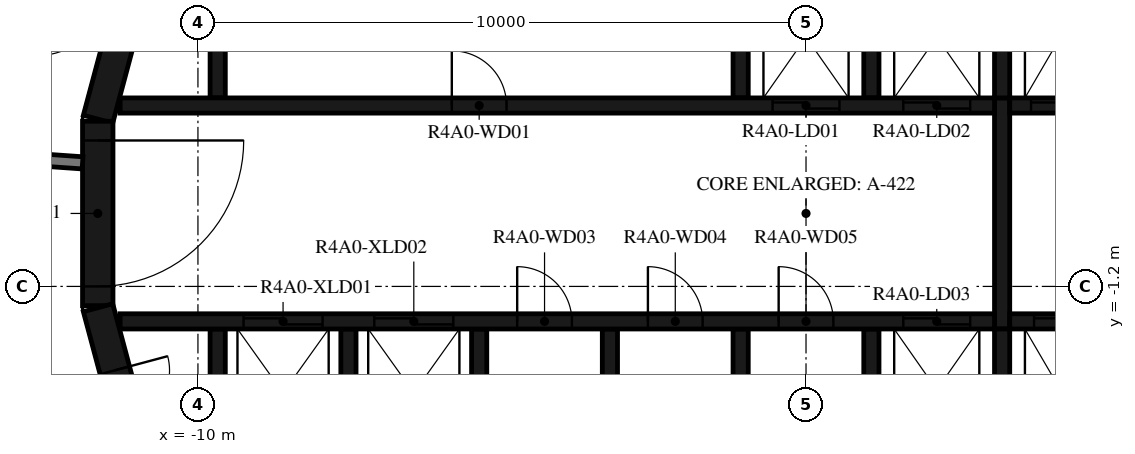
"""IFC4 building model, lengths in metres.
Left out: names, types, materials, properties, quantities, classifications, styles, units other than length and angle.
Written with IfcOpenShell. Run it as: python <this file> out.ifc"""

import sys

from ifc_helpers import new_model, si_unit, direction, frame, frame_2d, origin, place, context, subcontext, project, spatial, polyline, rectangle, outline, extrude, element, fill, save


model = new_model("IFC4")
c1 = context("Model", 3, precision=1e-05, world=origin(), true_north=direction((0.0, 1.0)))
c2 = subcontext(c1, "Body", "Model", "MODEL_VIEW")
j1 = project(units=[si_unit("LENGTHUNIT", "METRE"), si_unit("PLANEANGLEUNIT", "RADIAN")], contexts=[c1])
p1 = place(None, origin())
s1 = spatial("IfcSite", under=j1, at=p1, CompositionType="ELEMENT")
p2 = place(p1, origin())
s2 = spatial("IfcBuilding", under=s1, at=p2, CompositionType="ELEMENT")
p3 = place(p2, frame((0.0, 0.0, 158.7)))
s3 = spatial("IfcBuildingStorey", under=s2, at=p3, CompositionType="ELEMENT", Elevation=158.7)
p4 = place(p3, frame((-10.858, 4.479, 0.0), z_axis=(0.0, 0.0, 1.0), x_axis=(-0.258734743916, -0.965948410781, 0.0)))
e1 = element("IfcWall", 1, at=p4, inside=s3, PredefinedType="SHEAR", context=c2, shape_type="SweptSolid", body=[
    extrude(rectangle(XDim=3.033, YDim=0.5, at=frame_2d((1.516, 0.0))), origin(), (0.0, 0.0, 1.0), 3.12),
])
p5 = place(p3, frame((-11.647, 1.516, 0.0), z_axis=(0.0, 0.0, 1.0), x_axis=(0.0, -1.0, 0.0)))
e2 = element("IfcWall", 2, at=p5, inside=s3, PredefinedType="SHEAR", context=c2, shape_type="SweptSolid", body=[
    extrude(rectangle(XDim=3.033, YDim=0.5, at=frame_2d((1.516, 0.0))), origin(), (0.0, 0.0, 1.0), 3.12),
])
p6 = place(p5, frame((0.316, 0.0, 0.0)))
e3 = element("IfcOpeningElement", 3, at=p6, cuts=e2, PredefinedType="OPENING", context=c2, shape_type="SweptSolid", body=[
    extrude(rectangle(XDim=2.4, YDim=2.1, at=frame_2d((1.2, 1.05))), frame((0.0, 0.26, 0.0), z_axis=(0.0, -1.0, 0.0), x_axis=(1.0, 0.0, 0.0)), (0.0, 0.0, 1.0), 0.52),
])
p7 = place(p3, frame((-11.643, -1.55, 0.0), z_axis=(0.0, 0.0, 1.0), x_axis=(0.258734743916, -0.965948410781, 0.0)))
e4 = element("IfcWall", 4, at=p7, inside=s3, PredefinedType="SHEAR", context=c2, shape_type="SweptSolid", body=[
    extrude(rectangle(XDim=3.033, YDim=0.5, at=frame_2d((1.516, 0.0))), origin(), (0.0, 0.0, 1.0), 3.12),
])
p8 = place(p7, frame((1.066, 0.0, 0.0)))
e5 = element("IfcOpeningElement", 5, at=p8, cuts=e4, PredefinedType="OPENING", context=c2, shape_type="SweptSolid", body=[
    extrude(rectangle(XDim=0.9, YDim=2.1, at=frame_2d((0.45, 1.05))), frame((0.0, 0.26, 0.0), z_axis=(0.0, -1.0, 0.0), x_axis=(1.0, 0.0, 0.0)), (0.0, 0.0, 1.0), 0.52),
])
p9 = place(p3, origin())
e6 = element("IfcWall", 6, at=p9, inside=s3, PredefinedType="SHEAR", context=c2, shape_type="SweptSolid", body=[
    extrude(outline(polyline([(-9.55, 4.8), (-1.2, 4.8), (-1.2, 1.9), (-0.95, 1.9), (-0.95, 4.8), (0.95, 4.8), (0.95, 1.9), (1.2, 1.9), (1.2, 4.8), (3.1, 4.8), (3.1, 1.9), (3.35, 1.9), (3.35, 4.8), (5.25, 4.8), (5.25, 1.9), (5.5, 1.9), (5.5, 4.8), (7.4, 4.8), (7.4, 1.9), (7.65, 1.9), (7.65, 4.8), (9.55, 4.8), (9.55, 1.9), (9.8, 1.9), (9.8, 4.8), (9.8, 5.05), (-9.8, 5.05), (-9.8, 4.8), (-9.8, 1.9), (-9.55, 1.9), (-9.55, 4.8)])), origin(), (0.0, 0.0, 1.0), 3.12),
])
p10 = place(p3, origin())
e7 = element("IfcWall", 7, at=p10, inside=s3, PredefinedType="SHEAR", context=c2, shape_type="SweptSolid", body=[
    extrude(outline(polyline([(9.8, -5.05), (9.8, -4.8), (9.8, -1.9), (9.55, -1.9), (9.55, -4.8), (7.65, -4.8), (7.65, -1.9), (7.4, -1.9), (7.4, -4.8), (5.5, -4.8), (5.5, -1.9), (5.25, -1.9), (5.25, -4.8), (3.35, -4.8), (3.35, -1.9), (3.1, -1.9), (3.1, -4.8), (1.2, -4.8), (1.2, -1.9), (0.95, -1.9), (0.95, -4.8), (-0.95, -4.8), (-0.95, -1.9), (-1.2, -1.9), (-1.2, -4.8), (-3.1, -4.8), (-3.1, -1.9), (-3.35, -1.9), (-3.35, -4.8), (-5.25, -4.8), (-5.25, -1.9), (-5.5, -1.9), (-5.5, -4.8), (-7.4, -4.8), (-7.4, -1.9), (-7.65, -1.9), (-7.65, -4.8), (-9.55, -4.8), (-9.55, -1.9), (-9.8, -1.9), (-9.8, -4.8), (-9.8, -5.05), (9.8, -5.05)])), origin(), (0.0, 0.0, 1.0), 3.12),
])
p11 = place(p3, frame((-11.28, 1.775, 0.0), z_axis=(0.0, 0.0, 1.0), x_axis=(1.0, 0.0, 0.0)))
e8 = element("IfcWall", 8, at=p11, inside=s3, PredefinedType="SHEAR", context=c2, shape_type="SweptSolid", body=[
    extrude(rectangle(XDim=14.38, YDim=0.25, at=frame_2d((7.19, 0.0))), origin(), (0.0, 0.0, 1.0), 3.12),
])
p12 = place(p11, frame((10.73, 0.0, 0.0)))
e9 = element("IfcOpeningElement", 9, at=p12, cuts=e8, PredefinedType="OPENING", context=c2, shape_type="SweptSolid", body=[
    extrude(rectangle(XDim=1.1, YDim=2.1, at=frame_2d((0.55, 1.05))), frame((0.0, 0.135, 0.0), z_axis=(0.0, -1.0, 0.0), x_axis=(1.0, 0.0, 0.0)), (0.0, 0.0, 1.0), 0.27),
])
p13 = place(p11, frame((12.88, 0.0, 0.0)))
e10 = element("IfcOpeningElement", 10, at=p13, cuts=e8, PredefinedType="OPENING", context=c2, shape_type="SweptSolid", body=[
    extrude(rectangle(XDim=1.1, YDim=2.1, at=frame_2d((0.55, 1.05))), frame((0.0, 0.135, 0.0), z_axis=(0.0, -1.0, 0.0), x_axis=(1.0, 0.0, 0.0)), (0.0, 0.0, 1.0), 0.27),
])
p14 = place(p11, frame((5.455, 0.0, 0.0)))
e11 = element("IfcOpeningElement", 11, at=p14, cuts=e8, PredefinedType="OPENING", context=c2, shape_type="SweptSolid", body=[
    extrude(rectangle(XDim=0.9, YDim=2.1, at=frame_2d((0.45, 1.05))), frame((0.0, 0.135, 0.0), z_axis=(0.0, -1.0, 0.0), x_axis=(1.0, 0.0, 0.0)), (0.0, 0.0, 1.0), 0.27),
])
p15 = place(p3, frame((3.35, 1.775, 0.0), z_axis=(0.0, 0.0, 1.0), x_axis=(1.0, 0.0, 0.0)))
e12 = element("IfcWall", 12, at=p15, inside=s3, PredefinedType="SHEAR", context=c2, shape_type="SweptSolid", body=[
    extrude(rectangle(XDim=7.93, YDim=0.25, at=frame_2d((3.965, 0.0))), origin(), (0.0, 0.0, 1.0), 3.12),
])
p16 = place(p15, frame((0.35, 0.0, 0.0)))
e13 = element("IfcOpeningElement", 13, at=p16, cuts=e12, PredefinedType="OPENING", context=c2, shape_type="SweptSolid", body=[
    extrude(rectangle(XDim=1.2, YDim=2.4, at=frame_2d((0.6, 1.2))), frame((0.0, 0.135, 0.0), z_axis=(0.0, -1.0, 0.0), x_axis=(1.0, 0.0, 0.0)), (0.0, 0.0, 1.0), 0.27),
])
p17 = place(p15, frame((2.5, 0.0, 0.0)))
e14 = element("IfcOpeningElement", 14, at=p17, cuts=e12, PredefinedType="OPENING", context=c2, shape_type="SweptSolid", body=[
    extrude(rectangle(XDim=1.2, YDim=2.4, at=frame_2d((0.6, 1.2))), frame((0.0, 0.135, 0.0), z_axis=(0.0, -1.0, 0.0), x_axis=(1.0, 0.0, 0.0)), (0.0, 0.0, 1.0), 0.27),
])
p18 = place(p15, frame((4.8, 0.0, 0.0)))
e15 = element("IfcOpeningElement", 15, at=p18, cuts=e12, PredefinedType="OPENING", context=c2, shape_type="SweptSolid", body=[
    extrude(rectangle(XDim=0.9, YDim=2.1, at=frame_2d((0.45, 1.05))), frame((0.0, 0.135, 0.0), z_axis=(0.0, -1.0, 0.0), x_axis=(1.0, 0.0, 0.0)), (0.0, 0.0, 1.0), 0.27),
])
p19 = place(p3, frame((-11.28, -1.775, 0.0), z_axis=(0.0, 0.0, 1.0), x_axis=(1.0, 0.0, 0.0)))
e16 = element("IfcWall", 16, at=p19, inside=s3, PredefinedType="SHEAR", context=c2, shape_type="SweptSolid", body=[
    extrude(rectangle(XDim=14.38, YDim=0.25, at=frame_2d((7.19, 0.0))), origin(), (0.0, 0.0, 1.0), 3.12),
])
p20 = place(p19, frame((2.03, 0.0, 0.0)))
e17 = element("IfcOpeningElement", 17, at=p20, cuts=e16, PredefinedType="OPENING", context=c2, shape_type="SweptSolid", body=[
    extrude(rectangle(XDim=1.3, YDim=2.1, at=frame_2d((0.65, 1.05))), frame((0.0, 0.135, 0.0), z_axis=(0.0, -1.0, 0.0), x_axis=(1.0, 0.0, 0.0)), (0.0, 0.0, 1.0), 0.27),
])
p21 = place(p19, frame((4.18, 0.0, 0.0)))
e18 = element("IfcOpeningElement", 18, at=p21, cuts=e16, PredefinedType="OPENING", context=c2, shape_type="SweptSolid", body=[
    extrude(rectangle(XDim=1.3, YDim=2.1, at=frame_2d((0.65, 1.05))), frame((0.0, 0.135, 0.0), z_axis=(0.0, -1.0, 0.0), x_axis=(1.0, 0.0, 0.0)), (0.0, 0.0, 1.0), 0.27),
])
p22 = place(p19, frame((12.88, 0.0, 0.0)))
e19 = element("IfcOpeningElement", 19, at=p22, cuts=e16, PredefinedType="OPENING", context=c2, shape_type="SweptSolid", body=[
    extrude(rectangle(XDim=1.1, YDim=2.1, at=frame_2d((0.55, 1.05))), frame((0.0, 0.135, 0.0), z_axis=(0.0, -1.0, 0.0), x_axis=(1.0, 0.0, 0.0)), (0.0, 0.0, 1.0), 0.27),
])
p23 = place(p19, frame((6.53, 0.0, 0.0)))
e20 = element("IfcOpeningElement", 20, at=p23, cuts=e16, PredefinedType="OPENING", context=c2, shape_type="SweptSolid", body=[
    extrude(rectangle(XDim=0.9, YDim=2.1, at=frame_2d((0.45, 1.05))), frame((0.0, 0.135, 0.0), z_axis=(0.0, -1.0, 0.0), x_axis=(1.0, 0.0, 0.0)), (0.0, 0.0, 1.0), 0.27),
])
p24 = place(p19, frame((8.68, 0.0, 0.0)))
e21 = element("IfcOpeningElement", 21, at=p24, cuts=e16, PredefinedType="OPENING", context=c2, shape_type="SweptSolid", body=[
    extrude(rectangle(XDim=0.9, YDim=2.1, at=frame_2d((0.45, 1.05))), frame((0.0, 0.135, 0.0), z_axis=(0.0, -1.0, 0.0), x_axis=(1.0, 0.0, 0.0)), (0.0, 0.0, 1.0), 0.27),
])
p25 = place(p19, frame((10.83, 0.0, 0.0)))
e22 = element("IfcOpeningElement", 22, at=p25, cuts=e16, PredefinedType="OPENING", context=c2, shape_type="SweptSolid", body=[
    extrude(rectangle(XDim=0.9, YDim=2.1, at=frame_2d((0.45, 1.05))), frame((0.0, 0.135, 0.0), z_axis=(0.0, -1.0, 0.0), x_axis=(1.0, 0.0, 0.0)), (0.0, 0.0, 1.0), 0.27),
])
p26 = place(p3, frame((3.35, -1.775, 0.0), z_axis=(0.0, 0.0, 1.0), x_axis=(1.0, 0.0, 0.0)))
e23 = element("IfcWall", 23, at=p26, inside=s3, PredefinedType="SHEAR", context=c2, shape_type="SweptSolid", body=[
    extrude(rectangle(XDim=7.93, YDim=0.25, at=frame_2d((3.965, 0.0))), origin(), (0.0, 0.0, 1.0), 3.12),
])
p27 = place(p26, frame((0.4, 0.0, 0.0)))
e24 = element("IfcOpeningElement", 24, at=p27, cuts=e23, PredefinedType="OPENING", context=c2, shape_type="SweptSolid", body=[
    extrude(rectangle(XDim=1.1, YDim=2.4, at=frame_2d((0.55, 1.2))), frame((0.0, 0.135, 0.0), z_axis=(0.0, -1.0, 0.0), x_axis=(1.0, 0.0, 0.0)), (0.0, 0.0, 1.0), 0.27),
])
p28 = place(p26, frame((2.55, 0.0, 0.0)))
e25 = element("IfcOpeningElement", 25, at=p28, cuts=e23, PredefinedType="OPENING", context=c2, shape_type="SweptSolid", body=[
    extrude(rectangle(XDim=1.1, YDim=2.4, at=frame_2d((0.55, 1.2))), frame((0.0, 0.135, 0.0), z_axis=(0.0, -1.0, 0.0), x_axis=(1.0, 0.0, 0.0)), (0.0, 0.0, 1.0), 0.27),
])
p29 = place(p26, frame((4.7, 0.0, 0.0)))
e26 = element("IfcOpeningElement", 26, at=p29, cuts=e23, PredefinedType="OPENING", context=c2, shape_type="SweptSolid", body=[
    extrude(rectangle(XDim=1.1, YDim=2.4, at=frame_2d((0.55, 1.2))), frame((0.0, 0.135, 0.0), z_axis=(0.0, -1.0, 0.0), x_axis=(1.0, 0.0, 0.0)), (0.0, 0.0, 1.0), 0.27),
])
p30 = place(p3, frame((3.225, -1.9, 0.0), z_axis=(0.0, 0.0, 1.0), x_axis=(0.0, 1.0, 0.0)))
e27 = element("IfcWall", 27, at=p30, inside=s3, PredefinedType="SHEAR", context=c2, shape_type="SweptSolid", body=[
    extrude(rectangle(XDim=3.8, YDim=0.25, at=frame_2d((1.9, 0.0))), origin(), (0.0, 0.0, 1.0), 3.12),
])
p31 = place(p3, frame((-13.454, 0.941, 0.0), z_axis=(0.0, 0.0, 1.0), x_axis=(0.99755155062, -0.069934997354, 0.0)))
e28 = element("IfcWall", 28, at=p31, inside=s3, PredefinedType="STANDARD", context=c2, shape_type="SweptSolid", body=[
    extrude(rectangle(XDim=1.561, YDim=0.2, at=frame_2d((0.78, 0.0))), origin(), (0.0, 0.0, 1.0), 3.12),
])
p32 = place(p6, origin())
e29 = element("IfcDoor", 29, at=p32, inside=s3, OperationType="DOUBLE_DOOR_SINGLE_SWING", PredefinedType="DOOR", context=c2, shape_type="SweptSolid", body=[
    extrude(rectangle(XDim=2.4, YDim=2.1, at=frame_2d((1.2, 1.05))), frame((0.0, 0.025, 0.0), z_axis=(0.0, -1.0, 0.0), x_axis=(1.0, 0.0, 0.0)), (0.0, 0.0, 1.0), 0.05),
])
fill(e3, e29)
p33 = place(p12, origin())
e30 = element("IfcDoor", 30, at=p33, inside=s3, OperationType="DOUBLE_DOOR_SLIDING", PredefinedType="DOOR", context=c2, shape_type="SweptSolid", body=[
    extrude(rectangle(XDim=1.1, YDim=2.1, at=frame_2d((0.55, 1.05))), frame((0.0, 0.025, 0.0), z_axis=(0.0, -1.0, 0.0), x_axis=(1.0, 0.0, 0.0)), (0.0, 0.0, 1.0), 0.05),
])
fill(e9, e30)
p34 = place(p13, origin())
e31 = element("IfcDoor", 31, at=p34, inside=s3, OperationType="DOUBLE_DOOR_SLIDING", PredefinedType="DOOR", context=c2, shape_type="SweptSolid", body=[
    extrude(rectangle(XDim=1.1, YDim=2.1, at=frame_2d((0.55, 1.05))), frame((0.0, 0.025, 0.0), z_axis=(0.0, -1.0, 0.0), x_axis=(1.0, 0.0, 0.0)), (0.0, 0.0, 1.0), 0.05),
])
fill(e10, e31)
p35 = place(p16, origin())
e32 = element("IfcDoor", 32, at=p35, inside=s3, OperationType="DOUBLE_DOOR_SLIDING", PredefinedType="DOOR", context=c2, shape_type="SweptSolid", body=[
    extrude(rectangle(XDim=1.2, YDim=2.4, at=frame_2d((0.6, 1.2))), frame((0.0, 0.025, 0.0), z_axis=(0.0, -1.0, 0.0), x_axis=(1.0, 0.0, 0.0)), (0.0, 0.0, 1.0), 0.05),
])
fill(e13, e32)
p36 = place(p20, origin())
e33 = element("IfcDoor", 33, at=p36, inside=s3, OperationType="DOUBLE_DOOR_SLIDING", PredefinedType="DOOR", context=c2, shape_type="SweptSolid", body=[
    extrude(rectangle(XDim=1.3, YDim=2.1, at=frame_2d((0.65, 1.05))), frame((0.0, 0.025, 0.0), z_axis=(0.0, -1.0, 0.0), x_axis=(1.0, 0.0, 0.0)), (0.0, 0.0, 1.0), 0.05),
])
fill(e17, e33)
p37 = place(p21, origin())
e34 = element("IfcDoor", 34, at=p37, inside=s3, OperationType="DOUBLE_DOOR_SLIDING", PredefinedType="DOOR", context=c2, shape_type="SweptSolid", body=[
    extrude(rectangle(XDim=1.3, YDim=2.1, at=frame_2d((0.65, 1.05))), frame((0.0, 0.025, 0.0), z_axis=(0.0, -1.0, 0.0), x_axis=(1.0, 0.0, 0.0)), (0.0, 0.0, 1.0), 0.05),
])
fill(e18, e34)
p38 = place(p22, origin())
e35 = element("IfcDoor", 35, at=p38, inside=s3, OperationType="DOUBLE_DOOR_SLIDING", PredefinedType="DOOR", context=c2, shape_type="SweptSolid", body=[
    extrude(rectangle(XDim=1.1, YDim=2.1, at=frame_2d((0.55, 1.05))), frame((0.0, 0.025, 0.0), z_axis=(0.0, -1.0, 0.0), x_axis=(1.0, 0.0, 0.0)), (0.0, 0.0, 1.0), 0.05),
])
fill(e19, e35)
p39 = place(p27, origin())
e36 = element("IfcDoor", 36, at=p39, inside=s3, OperationType="DOUBLE_DOOR_SLIDING", PredefinedType="DOOR", context=c2, shape_type="SweptSolid", body=[
    extrude(rectangle(XDim=1.1, YDim=2.4, at=frame_2d((0.55, 1.2))), frame((0.0, 0.025, 0.0), z_axis=(0.0, -1.0, 0.0), x_axis=(1.0, 0.0, 0.0)), (0.0, 0.0, 1.0), 0.05),
])
fill(e24, e36)
p40 = place(p14, origin())
e37 = element("IfcDoor", 37, at=p40, inside=s3, OperationType="SINGLE_SWING_LEFT", PredefinedType="DOOR", context=c2, shape_type="SweptSolid", body=[
    extrude(rectangle(XDim=0.9, YDim=2.1, at=frame_2d((0.45, 1.05))), frame((0.0, 0.025, 0.0), z_axis=(0.0, -1.0, 0.0), x_axis=(1.0, 0.0, 0.0)), (0.0, 0.0, 1.0), 0.05),
])
fill(e11, e37)
p41 = place(p23, origin())
e38 = element("IfcDoor", 38, at=p41, inside=s3, OperationType="SINGLE_SWING_LEFT", PredefinedType="DOOR", context=c2, shape_type="SweptSolid", body=[
    extrude(rectangle(XDim=0.9, YDim=2.1, at=frame_2d((0.45, 1.05))), frame((0.0, 0.025, 0.0), z_axis=(0.0, -1.0, 0.0), x_axis=(1.0, 0.0, 0.0)), (0.0, 0.0, 1.0), 0.05),
])
fill(e20, e38)
p42 = place(p24, origin())
e39 = element("IfcDoor", 39, at=p42, inside=s3, OperationType="SINGLE_SWING_RIGHT", PredefinedType="DOOR", context=c2, shape_type="SweptSolid", body=[
    extrude(rectangle(XDim=0.9, YDim=2.1, at=frame_2d((0.45, 1.05))), frame((0.0, 0.025, 0.0), z_axis=(0.0, -1.0, 0.0), x_axis=(1.0, 0.0, 0.0)), (0.0, 0.0, 1.0), 0.05),
])
fill(e21, e39)
p43 = place(p25, origin())
e40 = element("IfcDoor", 40, at=p43, inside=s3, OperationType="SINGLE_SWING_LEFT", PredefinedType="DOOR", context=c2, shape_type="SweptSolid", body=[
    extrude(rectangle(XDim=0.9, YDim=2.1, at=frame_2d((0.45, 1.05))), frame((0.0, 0.025, 0.0), z_axis=(0.0, -1.0, 0.0), x_axis=(1.0, 0.0, 0.0)), (0.0, 0.0, 1.0), 0.05),
])
fill(e22, e40)
p44 = place(p8, origin())
e41 = element("IfcDoor", 41, at=p44, inside=s3, OperationType="SINGLE_SWING_RIGHT", PredefinedType="DOOR", context=c2, shape_type="SweptSolid", body=[
    extrude(rectangle(XDim=0.9, YDim=2.1, at=frame_2d((0.45, 1.05))), frame((0.0, 0.025, 0.0), z_axis=(0.0, -1.0, 0.0), x_axis=(1.0, 0.0, 0.0)), (0.0, 0.0, 1.0), 0.05),
])
fill(e5, e41)
save(model, sys.argv[1])
